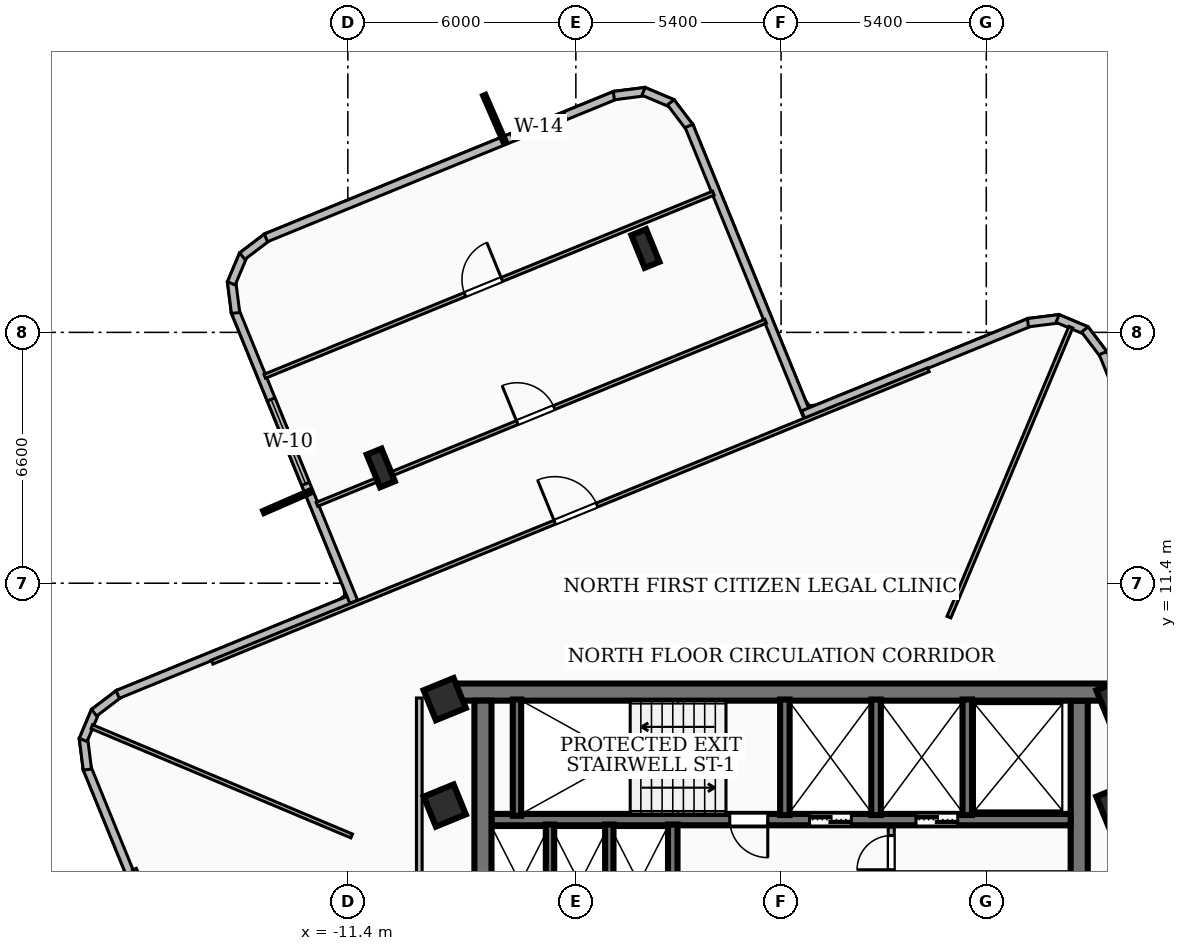
"""IFC4 building model, lengths in metres.
Left out: names, types, materials, properties, quantities, classifications, styles, units other than length and angle.
Written with IfcOpenShell. Run it as: python <this file> out.ifc"""

import sys

from ifc_helpers import new_model, si_unit, direction, frame, frame_2d, origin, origin_2d, place, context, subcontext, project, spatial, rectangle, i_section, extrude, element, fill, save


model = new_model("IFC4")
c1 = context("Model", 3, precision=1e-05, world=origin(), true_north=direction((0.0, 1.0)))
c2 = subcontext(c1, "Body", "Model", "MODEL_VIEW")
j1 = project(units=[si_unit("LENGTHUNIT", "METRE"), si_unit("PLANEANGLEUNIT", "RADIAN")], contexts=[c1])
p1 = place(None, origin())
s1 = spatial("IfcSite", under=j1, at=p1, CompositionType="ELEMENT")
p2 = place(p1, origin())
s2 = spatial("IfcBuilding", under=s1, at=p2, CompositionType="ELEMENT")
p3 = place(p2, frame((0.0, 0.0, 173.88)))
s3 = spatial("IfcBuildingStorey", under=s2, at=p3, CompositionType="ELEMENT", Elevation=173.88)
p4 = place(p3, frame((-8.78, 8.535, 0.0), z_axis=(0.0, 0.0, 1.0), x_axis=(1.0, 0.0, 0.0)))
e1 = element("IfcWall", 1, at=p4, inside=s3, PredefinedType="SHEAR", context=c2, shape_type="SweptSolid", body=[
    extrude(rectangle(XDim=17.56, YDim=0.45, at=frame_2d((8.78, 0.0))), origin(), (0.0, 0.0, 1.0), 3.34),
])
for number, where, z_axis, x_axis in (
    (2, (-7.845, 1.975, 0.0), (0.0, 0.0, 1.0), (0.0, 1.0, 0.0)),
    (3, (7.845, 8.31, 0.0), (0.0, 0.0, 1.0), (0.0, -1.0, 0.0)),
):
    element("IfcWall", number, at=place(p3, frame(where, z_axis=z_axis, x_axis=x_axis)), inside=s3, PredefinedType="SHEAR", context=c2, shape_type="SweptSolid", body=[
        extrude(rectangle(XDim=6.335, YDim=0.45, at=frame_2d((3.167, 0.0))), origin(), (0.0, 0.0, 1.0), 3.34),
    ])
p5 = place(p3, frame((7.62, 5.18, 0.0), z_axis=(0.0, 0.0, 1.0), x_axis=(-1.0, 0.0, 0.0)))
e4 = element("IfcWall", 4, at=p5, inside=s3, PredefinedType="SOLIDWALL", context=c2, shape_type="SweptSolid", body=[
    extrude(rectangle(XDim=15.24, YDim=0.3, at=frame_2d((7.62, 0.0))), origin(), (0.0, 0.0, 1.0), 3.34),
])
p6 = place(p5, frame((5.77, 0.0, 0.0)))
e5 = element("IfcOpeningElement", 5, at=p6, cuts=e4, PredefinedType="OPENING", context=c2, shape_type="SweptSolid", body=[
    extrude(rectangle(XDim=1.1, YDim=2.15, at=frame_2d((0.55, 1.075))), frame((0.0, 0.16, 0.0), z_axis=(0.0, -1.0, 0.0), x_axis=(1.0, 0.0, 0.0)), (0.0, 0.0, 1.0), 0.32),
])
p7 = place(p5, frame((2.97, 0.0, 0.0)))
e6 = element("IfcOpeningElement", 6, at=p7, cuts=e4, PredefinedType="OPENING", context=c2, shape_type="SweptSolid", body=[
    extrude(rectangle(XDim=1.1, YDim=2.15, at=frame_2d((0.55, 1.075))), frame((0.0, 0.16, 0.0), z_axis=(0.0, -1.0, 0.0), x_axis=(1.0, 0.0, 0.0)), (0.0, 0.0, 1.0), 0.32),
])
p8 = place(p5, frame((7.97, 0.0, 0.0)))
e7 = element("IfcOpeningElement", 7, at=p8, cuts=e4, PredefinedType="OPENING", context=c2, shape_type="SweptSolid", body=[
    extrude(rectangle(XDim=1.0, YDim=2.1, at=frame_2d((0.5, 1.05))), frame((0.0, 0.16, 0.0), z_axis=(0.0, -1.0, 0.0), x_axis=(1.0, 0.0, 0.0)), (0.0, 0.0, 1.0), 0.32),
])
p9 = place(p3, frame((-6.95, 5.28, 0.0), z_axis=(0.0, 0.0, 1.0), x_axis=(0.0, 1.0, 0.0)))
e8 = element("IfcWall", 8, at=p9, inside=s3, PredefinedType="SOLIDWALL", context=c2, shape_type="SweptSolid", body=[
    extrude(rectangle(XDim=3.06, YDim=0.22, at=frame_2d((1.53, 0.0))), origin(), (0.0, 0.0, 1.0), 3.34),
])
for number, where, z_axis, x_axis in (
    (9, (0.1, 5.3, 0.0), (0.0, 0.0, 1.0), (0.0, 1.0, 0.0)),
    (10, (2.5, 5.3, 0.0), (0.0, 0.0, 1.0), (0.0, 1.0, 0.0)),
    (11, (4.9, 5.3, 0.0), (0.0, 0.0, 1.0), (0.0, 1.0, 0.0)),
):
    element("IfcWall", number, at=place(p3, frame(where, z_axis=z_axis, x_axis=x_axis)), inside=s3, PredefinedType="SOLIDWALL", context=c2, shape_type="SweptSolid", body=[
        extrude(rectangle(XDim=3.04, YDim=0.25, at=frame_2d((1.52, 0.0))), origin(), (0.0, 0.0, 1.0), 3.34),
    ])
p10 = place(p3, frame((-2.85, 1.98, 0.0), z_axis=(0.0, 0.0, 1.0), x_axis=(0.0, 1.0, 0.0)))
e12 = element("IfcWall", 12, at=p10, inside=s3, PredefinedType="SOLIDWALL", context=c2, shape_type="SweptSolid", body=[
    extrude(rectangle(XDim=3.07, YDim=0.25, at=frame_2d((1.535, 0.0))), origin(), (0.0, 0.0, 1.0), 3.34),
])
for number, where, z_axis, x_axis in (
    (13, (-6.08, 1.98, 0.0), (0.0, 0.0, 1.0), (0.0, 1.0, 0.0)),
    (14, (-4.52, 1.98, 0.0), (0.0, 0.0, 1.0), (0.0, 1.0, 0.0)),
):
    element("IfcWall", number, at=place(p3, frame(where, z_axis=z_axis, x_axis=x_axis)), inside=s3, PredefinedType="SOLIDWALL", context=c2, shape_type="SweptSolid", body=[
        extrude(rectangle(XDim=3.07, YDim=0.22, at=frame_2d((1.535, 0.0))), origin(), (0.0, 0.0, 1.0), 3.34),
    ])
for number, where, z_axis, x_axis in (
    (15, (-8.85, 5.55, 0.0), (0.0, 0.0, 1.0), (0.926, 0.378, 0.0)),
    (16, (8.85, 5.55, 0.0), (0.0, 0.0, 1.0), (0.926, 0.378, 0.0)),
    (17, (-8.85, 8.35, 0.0), (0.0, 0.0, 1.0), (0.926, 0.378, 0.0)),
    (18, (8.85, 8.35, 0.0), (0.0, 0.0, 1.0), (0.926, 0.378, 0.0)),
):
    element("IfcColumn", number, at=place(p3, frame(where, z_axis=z_axis, x_axis=x_axis)), inside=s3, PredefinedType="COLUMN", context=c2, shape_type="SweptSolid", body=[
        extrude(rectangle(XDim=0.85, YDim=0.85, at=origin_2d()), origin(), (0.0, 0.0, 1.0), 3.6),
    ])
for number, where, z_axis, x_axis in (
    (19, (-3.57, 20.207, 0.0), (0.0, 0.0, 1.0), (0.926, 0.378, 0.0)),
    (20, (-10.533, 14.433, 0.0), (0.0, 0.0, 1.0), (0.926, 0.378, 0.0)),
):
    element("IfcColumn", number, at=place(p3, frame(where, z_axis=z_axis, x_axis=x_axis)), inside=s3, PredefinedType="COLUMN", context=c2, shape_type="SweptSolid", body=[
        extrude(i_section(OverallWidth=0.418, OverallDepth=0.927, WebThickness=0.019, FlangeThickness=0.032, at=origin_2d()), origin(), (0.0, 0.0, 1.0), 3.6),
    ])
p11 = place(p3, frame((-15.834, 0.583, 0.0), z_axis=(0.0, 0.0, 1.0), x_axis=(-0.377776256629, 0.925896916469, 0.0)))
e21 = element("IfcWall", 21, at=p11, inside=s3, PredefinedType="SOLIDWALL", context=c2, shape_type="SweptSolid", body=[
    extrude(rectangle(XDim=6.438, YDim=0.22, at=frame_2d((3.219, 0.0))), origin(), (0.0, 0.0, 1.0), 3.34),
])
p12 = place(p3, frame((-18.254, 6.496, 0.0), z_axis=(0.0, 0.0, 1.0), x_axis=(-0.124646916858, 0.992201162123, 0.0)))
e22 = element("IfcWall", 22, at=p12, inside=s3, PredefinedType="SOLIDWALL", context=c2, shape_type="SweptSolid", body=[
    extrude(rectangle(XDim=0.834, YDim=0.22, at=frame_2d((0.417, 0.0))), origin(), (0.0, 0.0, 1.0), 3.34),
])
p13 = place(p3, frame((-18.365, 7.276, 0.0), z_axis=(0.0, 0.0, 1.0), x_axis=(0.387977068381, 0.9216690265, 0.0)))
e23 = element("IfcWall", 23, at=p13, inside=s3, PredefinedType="SOLIDWALL", context=c2, shape_type="SweptSolid", body=[
    extrude(rectangle(XDim=0.819, YDim=0.22, at=frame_2d((0.41, 0.0))), origin(), (0.0, 0.0, 1.0), 3.34),
])
p14 = place(p3, frame((-18.077, 7.993, 0.0), z_axis=(0.0, 0.0, 1.0), x_axis=(0.796365329878, 0.604815890473, 0.0)))
e24 = element("IfcWall", 24, at=p14, inside=s3, PredefinedType="SOLIDWALL", context=c2, shape_type="SweptSolid", body=[
    extrude(rectangle(XDim=0.833, YDim=0.22, at=frame_2d((0.417, 0.0))), origin(), (0.0, 0.0, 1.0), 3.34),
])
p15 = place(p3, frame((-17.456, 8.473, 0.0), z_axis=(0.0, 0.0, 1.0), x_axis=(0.925916493636, 0.377728271133, 0.0)))
e25 = element("IfcWall", 25, at=p15, inside=s3, PredefinedType="SOLIDWALL", context=c2, shape_type="SweptSolid", body=[
    extrude(rectangle(XDim=6.759, YDim=0.22, at=frame_2d((3.379, 0.0))), origin(), (0.0, 0.0, 1.0), 3.34),
])
p16 = place(p3, frame((-11.246, 10.912, 0.0), z_axis=(0.0, 0.0, 1.0), x_axis=(-0.37779924707, 0.92588753578, 0.0)))
e26 = element("IfcWall", 26, at=p16, inside=s3, PredefinedType="SOLIDWALL", context=c2, shape_type="SweptSolid", body=[
    extrude(rectangle(XDim=8.258, YDim=0.22, at=frame_2d((4.129, 0.0))), origin(), (0.0, 0.0, 1.0), 3.34),
])
p17 = place(p16, frame((3.35, 0.0, 0.85)))
e27 = element("IfcOpeningElement", 27, at=p17, cuts=e26, PredefinedType="OPENING", context=c2, shape_type="SweptSolid", body=[
    extrude(rectangle(XDim=2.4, YDim=1.65, at=frame_2d((1.2, 0.825))), frame((0.0, 0.12, 0.0), z_axis=(0.0, -1.0, 0.0), x_axis=(1.0, 0.0, 0.0)), (0.0, 0.0, 1.0), 0.24),
])
p18 = place(p3, frame((-14.354, 18.51, 0.0), z_axis=(0.0, 0.0, 1.0), x_axis=(-0.125798873345, 0.992055766308, 0.0)))
e28 = element("IfcWall", 28, at=p18, inside=s3, PredefinedType="SOLIDWALL", context=c2, shape_type="SweptSolid", body=[
    extrude(rectangle(XDim=0.834, YDim=0.22, at=frame_2d((0.417, 0.0))), origin(), (0.0, 0.0, 1.0), 3.34),
])
p19 = place(p3, frame((-14.466, 19.29, 0.0), z_axis=(0.0, 0.0, 1.0), x_axis=(0.388336782412, 0.92151752204, 0.0)))
e29 = element("IfcWall", 29, at=p19, inside=s3, PredefinedType="SOLIDWALL", context=c2, shape_type="SweptSolid", body=[
    extrude(rectangle(XDim=0.819, YDim=0.22, at=frame_2d((0.41, 0.0))), origin(), (0.0, 0.0, 1.0), 3.34),
])
p20 = place(p3, frame((-14.178, 20.007, 0.0), z_axis=(0.0, 0.0, 1.0), x_axis=(0.797040931846, 0.603925287566, 0.0)))
e30 = element("IfcWall", 30, at=p20, inside=s3, PredefinedType="SOLIDWALL", context=c2, shape_type="SweptSolid", body=[
    extrude(rectangle(XDim=0.834, YDim=0.22, at=frame_2d((0.417, 0.0))), origin(), (0.0, 0.0, 1.0), 3.34),
])
p21 = place(p3, frame((-13.556, 20.487, 0.0), z_axis=(0.0, 0.0, 1.0), x_axis=(0.925910764104, 0.377742315497, 0.0)))
e31 = element("IfcWall", 31, at=p21, inside=s3, PredefinedType="SOLIDWALL", context=c2, shape_type="SweptSolid", body=[
    extrude(rectangle(XDim=9.94, YDim=0.22, at=frame_2d((4.97, 0.0))), origin(), (0.0, 0.0, 1.0), 3.34),
])
p22 = place(p21, frame((7.004, 0.0, 0.85)))
e32 = element("IfcOpeningElement", 32, at=p22, cuts=e31, PredefinedType="OPENING", context=c2, shape_type="SweptSolid", body=[
    extrude(rectangle(XDim=1.5, YDim=1.5, at=frame_2d((0.75, 0.75))), frame((0.0, 0.12, 0.0), z_axis=(0.0, -1.0, 0.0), x_axis=(1.0, 0.0, 0.0)), (0.0, 0.0, 1.0), 0.24),
])
p23 = place(p3, frame((-4.4, 24.23, 0.0), z_axis=(0.0, 0.0, 1.0), x_axis=(0.992055766308, 0.125798873345, 0.0)))
e33 = element("IfcWall", 33, at=p23, inside=s3, PredefinedType="SOLIDWALL", context=c2, shape_type="SweptSolid", body=[
    extrude(rectangle(XDim=0.834, YDim=0.22, at=frame_2d((0.417, 0.0))), origin(), (0.0, 0.0, 1.0), 3.34),
])
p24 = place(p3, frame((-3.62, 24.342, 0.0), z_axis=(0.0, 0.0, 1.0), x_axis=(0.921135688986, -0.389241624799, 0.0)))
e34 = element("IfcWall", 34, at=p24, inside=s3, PredefinedType="SOLIDWALL", context=c2, shape_type="SweptSolid", body=[
    extrude(rectangle(XDim=0.82, YDim=0.22, at=frame_2d((0.41, 0.0))), origin(), (0.0, 0.0, 1.0), 3.34),
])
p25 = place(p3, frame((-2.903, 24.053, 0.0), z_axis=(0.0, 0.0, 1.0), x_axis=(0.604674842585, -0.79647243188, 0.0)))
e35 = element("IfcWall", 35, at=p25, inside=s3, PredefinedType="SOLIDWALL", context=c2, shape_type="SweptSolid", body=[
    extrude(rectangle(XDim=0.834, YDim=0.22, at=frame_2d((0.417, 0.0))), origin(), (0.0, 0.0, 1.0), 3.34),
])
p26 = place(p3, frame((-2.423, 23.432, 0.0), z_axis=(0.0, 0.0, 1.0), x_axis=(0.377824590968, -0.925877194049, 0.0)))
e36 = element("IfcWall", 36, at=p26, inside=s3, PredefinedType="SOLIDWALL", context=c2, shape_type="SweptSolid", body=[
    extrude(rectangle(XDim=8.258, YDim=0.22, at=frame_2d((4.129, 0.0))), origin(), (0.0, 0.0, 1.0), 2.644),
])
p27 = place(p3, frame((0.583, 15.834, 0.0), z_axis=(0.0, 0.0, 1.0), x_axis=(0.925896916469, 0.377776256629, 0.0)))
e37 = element("IfcWall", 37, at=p27, inside=s3, PredefinedType="SOLIDWALL", context=c2, shape_type="SweptSolid", body=[
    extrude(rectangle(XDim=6.438, YDim=0.22, at=frame_2d((3.219, 0.0))), origin(), (0.0, 0.0, 1.0), 2.644),
])
p28 = place(p3, frame((6.496, 18.254, 0.0), z_axis=(0.0, 0.0, 1.0), x_axis=(0.992201162123, 0.124646916858, 0.0)))
e38 = element("IfcWall", 38, at=p28, inside=s3, PredefinedType="SOLIDWALL", context=c2, shape_type="SweptSolid", body=[
    extrude(rectangle(XDim=0.834, YDim=0.22, at=frame_2d((0.417, 0.0))), origin(), (0.0, 0.0, 1.0), 3.34),
])
p29 = place(p3, frame((7.276, 18.365, 0.0), z_axis=(0.0, 0.0, 1.0), x_axis=(0.9216690265, -0.387977068381, 0.0)))
e39 = element("IfcWall", 39, at=p29, inside=s3, PredefinedType="SOLIDWALL", context=c2, shape_type="SweptSolid", body=[
    extrude(rectangle(XDim=0.819, YDim=0.22, at=frame_2d((0.41, 0.0))), origin(), (0.0, 0.0, 1.0), 3.34),
])
p30 = place(p3, frame((7.993, 18.077, 0.0), z_axis=(0.0, 0.0, 1.0), x_axis=(0.604815890473, -0.796365329878, 0.0)))
e40 = element("IfcWall", 40, at=p30, inside=s3, PredefinedType="SOLIDWALL", context=c2, shape_type="SweptSolid", body=[
    extrude(rectangle(XDim=0.833, YDim=0.22, at=frame_2d((0.417, 0.0))), origin(), (0.0, 0.0, 1.0), 3.34),
])
p31 = place(p3, frame((8.473, 17.456, 0.0), z_axis=(0.0, 0.0, 1.0), x_axis=(0.377728271133, -0.925916493636, 0.0)))
e41 = element("IfcWall", 41, at=p31, inside=s3, PredefinedType="SOLIDWALL", context=c2, shape_type="SweptSolid", body=[
    extrude(rectangle(XDim=6.759, YDim=0.22, at=frame_2d((3.379, 0.0))), origin(), (0.0, 0.0, 1.0), 2.644),
])
p32 = place(p3, frame((2.9, 2.04, 0.0), z_axis=(0.0, 0.0, 1.0), x_axis=(0.0, 1.0, 0.0)))
e42 = element("IfcWall", 42, at=p32, inside=s3, PredefinedType="PARTITIONING", context=c2, shape_type="SweptSolid", body=[
    extrude(rectangle(XDim=2.94, YDim=0.16, at=frame_2d((1.47, 0.0))), origin(), (0.0, 0.0, 1.0), 2.57),
])
p33 = place(p32, frame((1.82, 0.0, 0.0)))
e43 = element("IfcOpeningElement", 43, at=p33, cuts=e42, PredefinedType="OPENING", context=c2, shape_type="SweptSolid", body=[
    extrude(rectangle(XDim=0.9, YDim=2.06, at=frame_2d((0.45, 1.03))), frame((0.0, 0.09, 0.0), z_axis=(0.0, -1.0, 0.0), x_axis=(1.0, 0.0, 0.0)), (0.0, 0.0, 1.0), 0.18),
])
p34 = place(p3, frame((2.9, 3.74, 0.0), z_axis=(0.0, 0.0, 1.0), x_axis=(1.0, 0.0, 0.0)))
e44 = element("IfcWall", 44, at=p34, inside=s3, PredefinedType="PARTITIONING", context=c2, shape_type="SweptSolid", body=[
    extrude(rectangle(XDim=4.65, YDim=0.138, at=frame_2d((2.325, 0.0))), origin(), (0.0, 0.0, 1.0), 3.34),
])
p35 = place(p3, frame((-9.52, 1.75, 0.0), z_axis=(0.0, 0.0, 1.0), x_axis=(0.0, 1.0, 0.0)))
e45 = element("IfcWall", 45, at=p35, inside=s3, PredefinedType="PARTITIONING", context=c2, shape_type="SweptSolid", body=[
    extrude(rectangle(XDim=6.63, YDim=0.15, at=frame_2d((3.315, 0.0))), origin(), (0.0, 0.0, 1.0), 3.34),
])
p36 = place(p3, frame((4.418, 10.509, 0.0), z_axis=(0.0, 0.0, 1.0), x_axis=(0.387471247296, 0.921881788799, 0.0)))
e46 = element("IfcWall", 46, at=p36, inside=s3, PredefinedType="PARTITIONING", context=c2, shape_type="SweptSolid", body=[
    extrude(rectangle(XDim=8.274, YDim=0.11, at=frame_2d((4.137, 0.0))), origin(), (0.0, 0.0, 1.0), 2.644),
])
p37 = place(p3, frame((-11.3, 4.75, 0.0), z_axis=(0.0, 0.0, 1.0), x_axis=(-0.92186077199, 0.387521247245, 0.0)))
e47 = element("IfcWall", 47, at=p37, inside=s3, PredefinedType="PARTITIONING", context=c2, shape_type="SweptSolid", body=[
    extrude(rectangle(XDim=7.417, YDim=0.11, at=frame_2d((3.708, 0.0))), origin(), (0.0, 0.0, 1.0), 3.34),
])
p38 = place(p3, frame((-14.973, 9.323, 0.0), z_axis=(0.0, 0.0, 1.0), x_axis=(0.92584978414, 0.377891753295, 0.0)))
e48 = element("IfcWall", 48, at=p38, inside=s3, PredefinedType="PARTITIONING", context=c2, shape_type="SweptSolid", body=[
    extrude(rectangle(XDim=20.361, YDim=0.11, at=frame_2d((10.18, 0.0))), origin(), (0.0, 0.0, 1.0), 2.644),
])
p39 = place(p38, frame((9.741, 0.0, 0.0)))
e49 = element("IfcOpeningElement", 49, at=p39, cuts=e48, PredefinedType="OPENING", context=c2, shape_type="SweptSolid", body=[
    extrude(rectangle(XDim=1.2, YDim=2.1, at=frame_2d((0.6, 1.05))), frame((0.0, 0.065, 0.0), z_axis=(0.0, -1.0, 0.0), x_axis=(1.0, 0.0, 0.0)), (0.0, 0.0, 1.0), 0.13),
])
p40 = place(p3, frame((-12.212, 13.475, 0.0), z_axis=(0.0, 0.0, 1.0), x_axis=(0.925887289182, 0.377799851417, 0.0)))
e50 = element("IfcWall", 50, at=p40, inside=s3, PredefinedType="PARTITIONING", context=c2, shape_type="SweptSolid", body=[
    extrude(rectangle(XDim=12.75, YDim=0.11, at=frame_2d((6.375, 0.0))), origin(), (0.0, 0.0, 1.0), 2.644),
])
p41 = place(p40, frame((5.69, 0.0, 0.0)))
e51 = element("IfcOpeningElement", 51, at=p41, cuts=e50, PredefinedType="OPENING", context=c2, shape_type="SweptSolid", body=[
    extrude(rectangle(XDim=1.05, YDim=2.08, at=frame_2d((0.525, 1.04))), frame((0.0, 0.065, 0.0), z_axis=(0.0, -1.0, 0.0), x_axis=(1.0, 0.0, 0.0)), (0.0, 0.0, 1.0), 0.13),
])
p42 = place(p3, frame((-13.587, 16.845, 0.0), z_axis=(0.0, 0.0, 1.0), x_axis=(0.925853796027, 0.377881923864, 0.0)))
e52 = element("IfcWall", 52, at=p42, inside=s3, PredefinedType="PARTITIONING", context=c2, shape_type="SweptSolid", body=[
    extrude(rectangle(XDim=12.75, YDim=0.11, at=frame_2d((6.375, 0.0))), origin(), (0.0, 0.0, 1.0), 3.34),
])
p43 = place(p42, frame((5.69, 0.0, 0.0)))
e53 = element("IfcOpeningElement", 53, at=p43, cuts=e52, PredefinedType="OPENING", context=c2, shape_type="SweptSolid", body=[
    extrude(rectangle(XDim=1.05, YDim=2.08, at=frame_2d((0.525, 1.04))), frame((0.0, 0.065, 0.0), z_axis=(0.0, -1.0, 0.0), x_axis=(1.0, 0.0, 0.0)), (0.0, 0.0, 1.0), 0.13),
])
p44 = place(p3, frame((-9.323, -14.973, 0.0), z_axis=(0.0, 0.0, 1.0), x_axis=(-0.377891753295, 0.92584978414, 0.0)))
e54 = element("IfcWall", 54, at=p44, inside=s3, PredefinedType="PARTITIONING", context=c2, shape_type="SweptSolid", body=[
    extrude(rectangle(XDim=20.361, YDim=0.11, at=frame_2d((10.18, 0.0))), origin(), (0.0, 0.0, 1.0), 2.644),
])
p45 = place(p44, frame((9.741, 0.0, 0.0)))
e55 = element("IfcOpeningElement", 55, at=p45, cuts=e54, PredefinedType="OPENING", context=c2, shape_type="SweptSolid", body=[
    extrude(rectangle(XDim=1.2, YDim=2.1, at=frame_2d((0.6, 1.05))), frame((0.0, 0.065, 0.0), z_axis=(0.0, -1.0, 0.0), x_axis=(1.0, 0.0, 0.0)), (0.0, 0.0, 1.0), 0.13),
])
p46 = place(p17, origin())
e56 = element("IfcWindow", 56, at=p46, inside=s3, PartitioningType="SINGLE_PANEL", PredefinedType="WINDOW", context=c2, shape_type="SweptSolid", body=[
    extrude(rectangle(XDim=2.4, YDim=1.65, at=frame_2d((1.2, 0.825))), frame((0.0, 0.03, 0.0), z_axis=(0.0, -1.0, 0.0), x_axis=(1.0, 0.0, 0.0)), (0.0, 0.0, 1.0), 0.06),
])
fill(e27, e56)
p47 = place(p22, origin())
e57 = element("IfcWindow", 57, at=p47, inside=s3, PartitioningType="SINGLE_PANEL", PredefinedType="WINDOW", context=c2, shape_type="SweptSolid", body=[
    extrude(rectangle(XDim=1.5, YDim=1.5, at=frame_2d((0.75, 0.75))), frame((0.0, 0.03, 0.0), z_axis=(0.0, -1.0, 0.0), x_axis=(1.0, 0.0, 0.0)), (0.0, 0.0, 1.0), 0.06),
])
fill(e32, e57)
p48 = place(p6, origin())
e58 = element("IfcDoor", 58, at=p48, inside=s3, OperationType="DOUBLE_DOOR_SLIDING", PredefinedType="DOOR", context=c2, shape_type="SweptSolid", body=[
    extrude(rectangle(XDim=1.1, YDim=2.15, at=frame_2d((0.55, 1.075))), frame((0.0, 0.025, 0.0), z_axis=(0.0, -1.0, 0.0), x_axis=(1.0, 0.0, 0.0)), (0.0, 0.0, 1.0), 0.05),
])
fill(e5, e58)
p49 = place(p7, origin())
e59 = element("IfcDoor", 59, at=p49, inside=s3, OperationType="DOUBLE_DOOR_SLIDING", PredefinedType="DOOR", context=c2, shape_type="SweptSolid", body=[
    extrude(rectangle(XDim=1.1, YDim=2.15, at=frame_2d((0.55, 1.075))), frame((0.0, 0.025, 0.0), z_axis=(0.0, -1.0, 0.0), x_axis=(1.0, 0.0, 0.0)), (0.0, 0.0, 1.0), 0.05),
])
fill(e6, e59)
p50 = place(p8, origin())
e60 = element("IfcDoor", 60, at=p50, inside=s3, OperationType="SINGLE_SWING_LEFT", PredefinedType="DOOR", context=c2, shape_type="SweptSolid", body=[
    extrude(rectangle(XDim=1.0, YDim=2.1, at=frame_2d((0.5, 1.05))), frame((0.0, 0.025, 0.0), z_axis=(0.0, -1.0, 0.0), x_axis=(1.0, 0.0, 0.0)), (0.0, 0.0, 1.0), 0.05),
])
fill(e7, e60)
p51 = place(p33, origin())
e61 = element("IfcDoor", 61, at=p51, inside=s3, OperationType="SINGLE_SWING_LEFT", PredefinedType="DOOR", context=c2, shape_type="SweptSolid", body=[
    extrude(rectangle(XDim=0.9, YDim=2.06, at=frame_2d((0.45, 1.03))), frame((0.0, 0.025, 0.0), z_axis=(0.0, -1.0, 0.0), x_axis=(1.0, 0.0, 0.0)), (0.0, 0.0, 1.0), 0.05),
])
fill(e43, e61)
p52 = place(p39, origin())
e62 = element("IfcDoor", 62, at=p52, inside=s3, OperationType="SINGLE_SWING_LEFT", PredefinedType="DOOR", context=c2, shape_type="SweptSolid", body=[
    extrude(rectangle(XDim=1.2, YDim=2.1, at=frame_2d((0.6, 1.05))), frame((0.0, 0.025, 0.0), z_axis=(0.0, -1.0, 0.0), x_axis=(1.0, 0.0, 0.0)), (0.0, 0.0, 1.0), 0.05),
])
fill(e49, e62)
p53 = place(p41, origin())
e63 = element("IfcDoor", 63, at=p53, inside=s3, OperationType="SINGLE_SWING_LEFT", PredefinedType="DOOR", context=c2, shape_type="SweptSolid", body=[
    extrude(rectangle(XDim=1.05, YDim=2.08, at=frame_2d((0.525, 1.04))), frame((0.0, 0.025, 0.0), z_axis=(0.0, -1.0, 0.0), x_axis=(1.0, 0.0, 0.0)), (0.0, 0.0, 1.0), 0.05),
])
fill(e51, e63)
p54 = place(p43, origin())
e64 = element("IfcDoor", 64, at=p54, inside=s3, OperationType="SINGLE_SWING_RIGHT", PredefinedType="DOOR", context=c2, shape_type="SweptSolid", body=[
    extrude(rectangle(XDim=1.05, YDim=2.08, at=frame_2d((0.525, 1.04))), frame((0.0, 0.025, 0.0), z_axis=(0.0, -1.0, 0.0), x_axis=(1.0, 0.0, 0.0)), (0.0, 0.0, 1.0), 0.05),
])
fill(e53, e64)
save(model, sys.argv[1])
